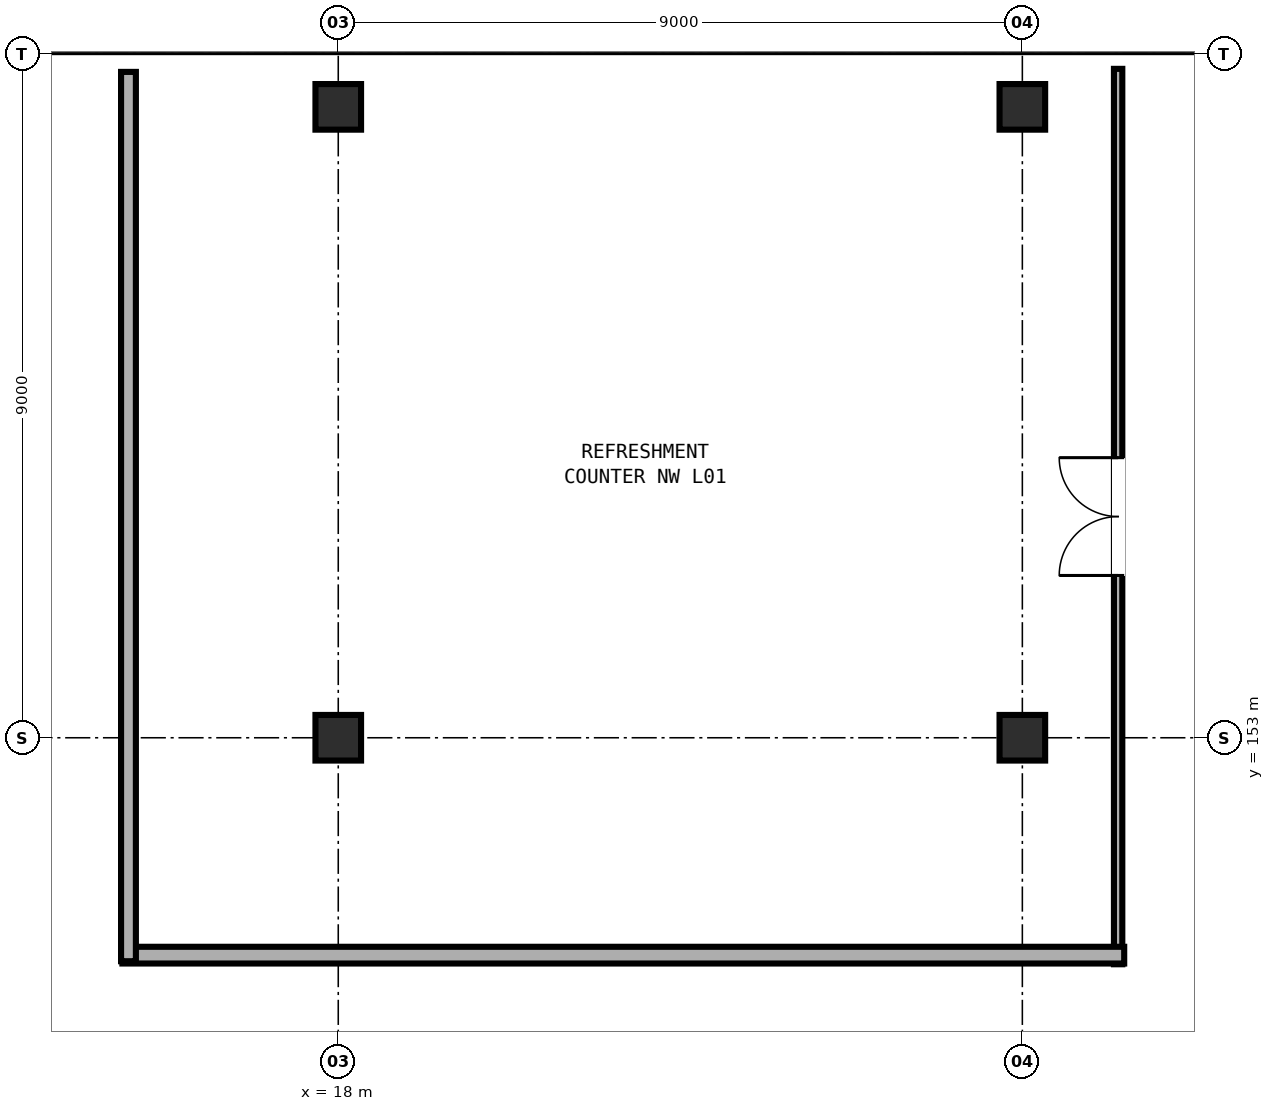
"""IFC4 building model, lengths in metres.
Left out: names, types, materials, properties, quantities, classifications, styles, units other than length and angle.
Written with IfcOpenShell. Run it as: python <this file> out.ifc"""

import sys

from ifc_helpers import new_model, si_unit, direction, frame, frame_2d, origin, origin_2d, place, context, subcontext, project, spatial, rectangle, extrude, element, fill, save


model = new_model("IFC4")
c1 = context("Model", 3, precision=1e-05, world=origin(), true_north=direction((0.0, 1.0)))
c2 = subcontext(c1, "Body", "Model", "MODEL_VIEW")
j1 = project(units=[si_unit("LENGTHUNIT", "METRE"), si_unit("PLANEANGLEUNIT", "RADIAN")], contexts=[c1])
p1 = place(None, origin())
s1 = spatial("IfcSite", under=j1, at=p1, CompositionType="ELEMENT")
p2 = place(p1, origin())
s2 = spatial("IfcBuilding", under=s1, at=p2, CompositionType="ELEMENT")
p3 = place(p2, frame((0.0, 0.0, 4.8)))
s3 = spatial("IfcBuildingStorey", under=s2, at=p3, CompositionType="ELEMENT", Elevation=4.8)
for number, where, z_axis, x_axis in (
    (1, (18.0, 153.0, 0.0), (0.0, 0.0, 1.0), (1.0, 0.0, 0.0)),
    (2, (18.0, 161.3, 0.0), (0.0, 0.0, 1.0), (1.0, 0.0, 0.0)),
    (3, (27.0, 153.0, 0.0), (0.0, 0.0, 1.0), (1.0, 0.0, 0.0)),
    (4, (27.0, 161.3, 0.0), (0.0, 0.0, 1.0), (1.0, 0.0, 0.0)),
):
    element("IfcColumn", number, at=place(p3, frame(where, z_axis=z_axis, x_axis=x_axis)), inside=s3, PredefinedType="COLUMN", context=c2, shape_type="SweptSolid", body=[
        extrude(rectangle(XDim=0.6, YDim=0.6, at=origin_2d()), origin(), (0.0, 0.0, 1.0), 4.8),
    ])
p4 = place(p3, frame((9.305, 161.8, 0.0), z_axis=(0.0, 0.0, 1.0), x_axis=(1.0, 0.0, 0.0)))
e5 = element("IfcWall", 5, at=p4, inside=s3, PredefinedType="SOLIDWALL", context=c2, shape_type="SweptSolid", body=[
    extrude(rectangle(XDim=8.39, YDim=0.42, at=frame_2d((4.195, 0.0))), origin(), (0.0, 0.0, 1.0), 3.58),
])
p5 = place(p4, frame((3.645, 0.0, 0.9)))
e6 = element("IfcOpeningElement", 6, at=p5, cuts=e5, PredefinedType="OPENING", context=c2, shape_type="SweptSolid", body=[
    extrude(rectangle(XDim=1.1, YDim=1.4, at=frame_2d((0.55, 0.7))), frame((0.0, 0.22, 0.0), z_axis=(0.0, -1.0, 0.0), x_axis=(1.0, 0.0, 0.0)), (0.0, 0.0, 1.0), 0.44),
])
p6 = place(p3, frame((18.305, 161.8, 0.0), z_axis=(0.0, 0.0, 1.0), x_axis=(1.0, 0.0, 0.0)))
e7 = element("IfcWall", 7, at=p6, inside=s3, PredefinedType="SOLIDWALL", context=c2, shape_type="SweptSolid", body=[
    extrude(rectangle(XDim=8.39, YDim=0.4, at=frame_2d((4.195, 0.0))), origin(), (0.0, 0.0, 1.0), 3.58),
])
p7 = place(p6, frame((3.595, 0.0, 0.9)))
e8 = element("IfcOpeningElement", 8, at=p7, cuts=e7, PredefinedType="OPENING", context=c2, shape_type="SweptSolid", body=[
    extrude(rectangle(XDim=1.2, YDim=1.45, at=frame_2d((0.6, 0.725))), frame((0.0, 0.21, 0.0), z_axis=(0.0, -1.0, 0.0), x_axis=(1.0, 0.0, 0.0)), (0.0, 0.0, 1.0), 0.42),
])
p8 = place(p3, frame((27.305, 161.8, 0.0), z_axis=(0.0, 0.0, 1.0), x_axis=(1.0, 0.0, 0.0)))
e9 = element("IfcWall", 9, at=p8, inside=s3, PredefinedType="SOLIDWALL", context=c2, shape_type="SweptSolid", body=[
    extrude(rectangle(XDim=8.39, YDim=0.38, at=frame_2d((4.195, 0.0))), origin(), (0.0, 0.0, 1.0), 3.58),
])
p9 = place(p8, frame((3.545, 0.0, 0.9)))
e10 = element("IfcOpeningElement", 10, at=p9, cuts=e9, PredefinedType="OPENING", context=c2, shape_type="SweptSolid", body=[
    extrude(rectangle(XDim=1.3, YDim=1.5, at=frame_2d((0.65, 0.75))), frame((0.0, 0.2, 0.0), z_axis=(0.0, -1.0, 0.0), x_axis=(1.0, 0.0, 0.0)), (0.0, 0.0, 1.0), 0.4),
])
p10 = place(p3, frame((28.26, 150.02, 0.0), z_axis=(0.0, 0.0, 1.0), x_axis=(0.0, 1.0, 0.0)))
e11 = element("IfcWall", 11, at=p10, inside=s3, PredefinedType="PARTITIONING", context=c2, shape_type="SweptSolid", body=[
    extrude(rectangle(XDim=11.78, YDim=0.11, at=frame_2d((5.89, 0.0))), origin(), (0.0, 0.0, 1.0), 3.28),
])
p11 = place(p10, frame((5.115, 0.0, 0.0)))
e12 = element("IfcOpeningElement", 12, at=p11, cuts=e11, PredefinedType="OPENING", context=c2, shape_type="SweptSolid", body=[
    extrude(rectangle(XDim=1.55, YDim=2.2, at=frame_2d((0.775, 1.1))), frame((0.0, 0.065, 0.0), z_axis=(0.0, -1.0, 0.0), x_axis=(1.0, 0.0, 0.0)), (0.0, 0.0, 1.0), 0.13),
])
p12 = place(p3, frame((28.34, 150.14, 0.0), z_axis=(0.0, 0.0, 1.0), x_axis=(-1.0, 0.0, 0.0)))
e13 = element("IfcWall", 13, at=p12, inside=s3, PredefinedType="PARTITIONING", context=c2, shape_type="SweptSolid", body=[
    extrude(rectangle(XDim=13.18, YDim=0.22, at=frame_2d((6.59, 0.0))), origin(), (0.0, 0.0, 1.0), 3.28),
])
p13 = place(p3, frame((15.24, 150.06, 0.0), z_axis=(0.0, 0.0, 1.0), x_axis=(0.0, 1.0, 0.0)))
e14 = element("IfcWall", 14, at=p13, inside=s3, PredefinedType="PARTITIONING", context=c2, shape_type="SweptSolid", body=[
    extrude(rectangle(XDim=11.7, YDim=0.195, at=frame_2d((5.85, 0.0))), origin(), (0.0, 0.0, 1.0), 3.28),
])
p14 = place(p7, origin())
e15 = element("IfcWindow", 15, at=p14, inside=s3, PartitioningType="SINGLE_PANEL", PredefinedType="WINDOW", context=c2, shape_type="SweptSolid", body=[
    extrude(rectangle(XDim=1.2, YDim=1.45, at=frame_2d((0.6, 0.725))), frame((0.0, 0.03, 0.0), z_axis=(0.0, -1.0, 0.0), x_axis=(1.0, 0.0, 0.0)), (0.0, 0.0, 1.0), 0.06),
])
fill(e8, e15)
p15 = place(p11, origin())
e16 = element("IfcDoor", 16, at=p15, inside=s3, OperationType="DOUBLE_DOOR_SINGLE_SWING", PredefinedType="DOOR", context=c2, shape_type="SweptSolid", body=[
    extrude(rectangle(XDim=1.55, YDim=2.2, at=frame_2d((0.775, 1.1))), frame((0.0, 0.025, 0.0), z_axis=(0.0, -1.0, 0.0), x_axis=(1.0, 0.0, 0.0)), (0.0, 0.0, 1.0), 0.05),
])
fill(e12, e16)
save(model, sys.argv[1])
